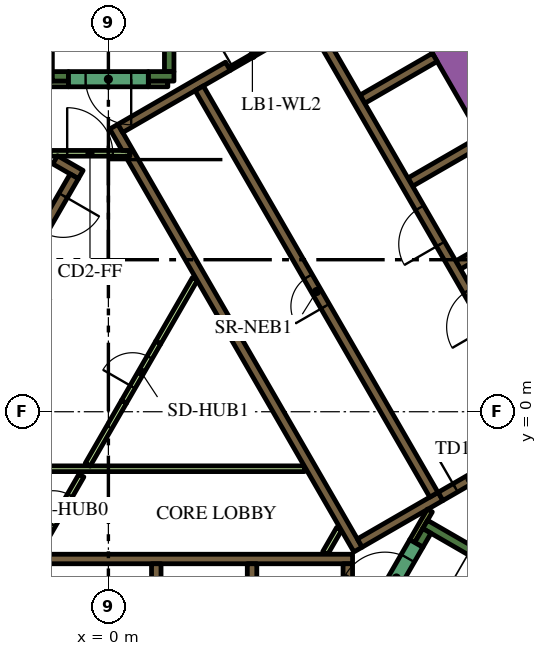
"""IFC4 building model, lengths in metres.
Left out: names, types, materials, properties, quantities, classifications, styles, units other than length and angle.
Written with IfcOpenShell. Run it as: python <this file> out.ifc"""

import sys

from ifc_helpers import new_model, si_unit, direction, frame, frame_2d, origin, place, context, subcontext, project, spatial, polyline, rectangle, outline, extrude, element, fill, save


model = new_model("IFC4")
c1 = context("Model", 3, precision=1e-05, world=origin(), true_north=direction((0.0, 1.0)))
c2 = subcontext(c1, "Body", "Model", "MODEL_VIEW")
j1 = project(units=[si_unit("LENGTHUNIT", "METRE"), si_unit("PLANEANGLEUNIT", "RADIAN")], contexts=[c1])
p1 = place(None, origin())
s1 = spatial("IfcSite", under=j1, at=p1, CompositionType="ELEMENT")
p2 = place(p1, origin())
s2 = spatial("IfcBuilding", under=s1, at=p2, CompositionType="ELEMENT")
p3 = place(p2, frame((0.0, 0.0, 95.4)))
s3 = spatial("IfcBuildingStorey", under=s2, at=p3, CompositionType="ELEMENT", Elevation=95.4)
p4 = place(p3, frame((6.776, 13.364, 0.0), z_axis=(0.0, 0.0, 1.0), x_axis=(0.500004177138, -0.8660229921, 0.0)))
e1 = element("IfcWall", 1, at=p4, inside=s3, PredefinedType="SOLIDWALL", context=c2, shape_type="SweptSolid", body=[
    extrude(rectangle(XDim=20.204, YDim=0.9, at=frame_2d((10.102, 0.0))), origin(), (0.0, 0.0, 1.0), 3.9),
])
p5 = place(p3, frame((8.334, -2.964, 0.0), z_axis=(0.0, 0.0, 1.0), x_axis=(0.866016039709, -0.500016218704, 0.0)))
e2 = element("IfcWall", 2, at=p5, inside=s3, PredefinedType="SOLIDWALL", context=c2, shape_type="SweptSolid", body=[
    extrude(rectangle(XDim=7.05, YDim=0.25, at=frame_2d((3.525, 0.0))), origin(), (0.0, 0.0, 1.0), 3.9),
])
p6 = place(p3, frame((8.168, -3.503, 0.0), z_axis=(0.0, 0.0, 1.0), x_axis=(0.49972245349, 0.866185586049, 0.0)))
e3 = element("IfcWall", 3, at=p6, inside=s3, PredefinedType="SOLIDWALL", context=c2, shape_type="SweptSolid", body=[
    extrude(rectangle(XDim=0.425, YDim=0.25, at=frame_2d((0.212, 0.0))), origin(), (0.0, 0.0, 1.0), 3.9),
])
p7 = place(p3, frame((1.6, 8.95, 0.0), z_axis=(0.0, 0.0, 1.0), x_axis=(0.0, 1.0, 0.0)))
e4 = element("IfcWall", 4, at=p7, inside=s3, PredefinedType="SOLIDWALL", context=c2, shape_type="SweptSolid", body=[
    extrude(rectangle(XDim=6.8, YDim=0.25, at=frame_2d((3.4, 0.0))), origin(), (0.0, 0.0, 1.0), 3.9),
])
p8 = place(p3, frame((1.05, 8.825, 0.0), z_axis=(0.0, 0.0, 1.0), x_axis=(1.0, 0.0, 0.0)))
e5 = element("IfcWall", 5, at=p8, inside=s3, PredefinedType="SOLIDWALL", context=c2, shape_type="SweptSolid", body=[
    extrude(rectangle(XDim=0.675, YDim=0.25, at=frame_2d((0.337, 0.0))), origin(), (0.0, 0.0, 1.0), 3.9),
])
p9 = place(p3, frame((-1.6, 8.7, 0.0), z_axis=(0.0, 0.0, 1.0), x_axis=(0.0, 1.0, 0.0)))
e6 = element("IfcWall", 6, at=p9, inside=s3, PredefinedType="SOLIDWALL", context=c2, shape_type="SweptSolid", body=[
    extrude(rectangle(XDim=7.05, YDim=0.25, at=frame_2d((3.525, 0.0))), origin(), (0.0, 0.0, 1.0), 3.9),
])
p10 = place(p3, frame((-1.475, 8.825, 0.0), z_axis=(0.0, 0.0, 1.0), x_axis=(1.0, 0.0, 0.0)))
e7 = element("IfcWall", 7, at=p10, inside=s3, PredefinedType="SOLIDWALL", context=c2, shape_type="SweptSolid", body=[
    extrude(rectangle(XDim=0.425, YDim=0.25, at=frame_2d((0.212, 0.0))), origin(), (0.0, 0.0, 1.0), 3.9),
])
p11 = place(p3, frame((-5.545, -3.875, 0.0), z_axis=(0.0, 0.0, 1.0), x_axis=(1.0, 0.0, 0.0)))
e8 = element("IfcWall", 8, at=p11, inside=s3, PredefinedType="SOLIDWALL", context=c2, shape_type="SweptSolid", body=[
    extrude(rectangle(XDim=11.97, YDim=0.25, at=frame_2d((5.985, 0.0))), origin(), (0.0, 0.0, 1.0), 3.9),
])
p12 = place(p3, frame((6.3, -7.268, 0.0), z_axis=(0.0, 0.0, 1.0), x_axis=(0.0, 1.0, 0.0)))
e9 = element("IfcWall", 9, at=p12, inside=s3, PredefinedType="SOLIDWALL", context=c2, shape_type="SweptSolid", body=[
    extrude(rectangle(XDim=3.268, YDim=0.25, at=frame_2d((1.634, 0.0))), origin(), (0.0, 0.0, 1.0), 3.9),
])
for number, where, z_axis, x_axis in (
    (10, (3.78, -4.0, 0.0), (0.0, 0.0, 1.0), (0.0, -1.0, 0.0)),
    (11, (1.26, -4.0, 0.0), (0.0, 0.0, 1.0), (0.0, -1.0, 0.0)),
):
    element("IfcWall", number, at=place(p3, frame(where, z_axis=z_axis, x_axis=x_axis)), inside=s3, PredefinedType="SOLIDWALL", context=c2, shape_type="SweptSolid", body=[
        extrude(rectangle(XDim=2.2, YDim=0.25, at=frame_2d((1.1, 0.0))), origin(), (0.0, 0.0, 1.0), 3.9),
    ])
p13 = place(p3, origin())
e12 = element("IfcWall", 12, at=p13, inside=s3, PredefinedType="SOLIDWALL", context=c2, shape_type="SweptSolid", body=[
    extrude(outline(polyline([(0.566, 6.725), (0.566, 6.875), (0.566, 6.875), (0.565, 6.875), (0.361, 6.875), (0.035, 7.439), (0.252, 7.564), (0.377, 7.348), (6.552, -3.348), (6.677, -3.564), (6.46, -3.689), (0.448, 6.725), (0.565, 6.725), (0.566, 6.725), (0.566, 6.725)])), origin(), (0.0, 0.0, 1.0), 3.9),
])
p14 = place(p3, frame((0.314, 7.456, 0.0), z_axis=(0.0, 0.0, 1.0), x_axis=(0.866013897511, 0.50001992892, 0.0)))
e13 = element("IfcWall", 13, at=p14, inside=s3, PredefinedType="SOLIDWALL", context=c2, shape_type="SweptSolid", body=[
    extrude(rectangle(XDim=3.268, YDim=0.25, at=frame_2d((1.634, 0.0))), origin(), (0.0, 0.0, 1.0), 3.9),
])
p15 = place(p3, frame((6.614, -3.456, 0.0), z_axis=(0.0, 0.0, 1.0), x_axis=(0.866031582473, 0.499989298045, 0.0)))
e14 = element("IfcWall", 14, at=p15, inside=s3, PredefinedType="SOLIDWALL", context=c2, shape_type="SweptSolid", body=[
    extrude(rectangle(XDim=2.455, YDim=0.25, at=frame_2d((1.228, 0.0))), origin(), (0.0, 0.0, 1.0), 3.9),
])
for number, where, z_axis, x_axis in (
    (15, (6.684, 8.224, 0.0), (0.0, 0.0, 1.0), (0.866, 0.5, 0.0)),
    (16, (7.944, 6.041, 0.0), (0.0, 0.0, 1.0), (0.866, 0.5, 0.0)),
    (17, (9.204, 3.859, 0.0), (0.0, 0.0, 1.0), (0.866, 0.5, 0.0)),
):
    element("IfcWall", number, at=place(p3, frame(where, z_axis=z_axis, x_axis=x_axis)), inside=s3, PredefinedType="SOLIDWALL", context=c2, shape_type="SweptSolid", body=[
        extrude(rectangle(XDim=2.2, YDim=0.25, at=frame_2d((1.1, 0.0))), origin(), (0.0, 0.0, 1.0), 3.9),
    ])
p16 = place(p3, frame((-0.728, 6.24, 0.0), z_axis=(0.0, 0.0, 1.0), x_axis=(-0.865955664968, 0.500120771724, 0.0)))
e18 = element("IfcWall", 18, at=p16, inside=s3, PredefinedType="SOLIDWALL", context=c2, shape_type="SweptSolid", body=[
    extrude(rectangle(XDim=0.778, YDim=0.25, at=frame_2d((0.389, 0.0))), origin(), (0.0, 0.0, 1.0), 3.9),
])
p17 = place(p3, frame((-2.196, 8.625, 0.0), z_axis=(0.0, 0.0, 1.0), x_axis=(1.0, 0.0, 0.0)))
e19 = element("IfcWall", 19, at=p17, inside=s3, PredefinedType="PARTITIONING", context=c2, shape_type="SweptSolid", body=[
    extrude(rectangle(XDim=1.146, YDim=0.15, at=frame_2d((0.573, 0.0))), origin(), (0.0, 0.0, 1.0), 2.75),
])
p18 = place(p3, frame((5.705, -3.718, 0.0), z_axis=(0.0, 0.0, 1.0), x_axis=(0.499962090823, 0.866047289552, 0.0)))
e20 = element("IfcWall", 20, at=p18, inside=s3, PredefinedType="PARTITIONING", context=c2, shape_type="SweptSolid", body=[
    extrude(rectangle(XDim=0.735, YDim=0.15, at=frame_2d((0.367, 0.0))), origin(), (0.0, 0.0, 1.0), 2.75),
])
p19 = place(p3, frame((8.459, -2.599, 0.0), z_axis=(0.0, 0.0, 1.0), x_axis=(-0.500041054325, -0.866001699761, 0.0)))
e21 = element("IfcWall", 21, at=p19, inside=s3, PredefinedType="PARTITIONING", context=c2, shape_type="SweptSolid", body=[
    extrude(rectangle(XDim=0.929, YDim=0.15, at=frame_2d((0.464, 0.0))), origin(), (0.0, 0.0, 1.0), 3.9),
])
p20 = place(p3, frame((-4.2, -1.5, 0.0), z_axis=(0.0, 0.0, 1.0), x_axis=(1.0, 0.0, 0.0)))
e22 = element("IfcWall", 22, at=p20, inside=s3, PredefinedType="PARTITIONING", context=c2, shape_type="SweptSolid", body=[
    extrude(rectangle(XDim=9.359, YDim=0.15, at=frame_2d((4.68, 0.0))), origin(), (0.0, 0.0, 1.0), 2.75),
])
p21 = place(p3, frame((-0.544, -1.393, 0.0), z_axis=(0.0, 0.0, 1.0), x_axis=(0.499928740635, 0.866066541489, 0.0)))
e23 = element("IfcWall", 23, at=p21, inside=s3, PredefinedType="PARTITIONING", context=c2, shape_type="SweptSolid", body=[
    extrude(rectangle(XDim=1.912, YDim=0.15, at=frame_2d((0.956, 0.0))), origin(), (0.0, 0.0, 1.0), 2.75),
])
p22 = place(p3, frame((1.312, 1.822, 0.0), z_axis=(0.0, 0.0, 1.0), x_axis=(0.500003549559, 0.866023354436, 0.0)))
e24 = element("IfcWall", 24, at=p22, inside=s3, PredefinedType="PARTITIONING", context=c2, shape_type="SweptSolid", body=[
    extrude(rectangle(XDim=1.93, YDim=0.15, at=frame_2d((0.965, 0.0))), origin(), (0.0, 0.0, 1.0), 2.75),
])
p23 = place(p3, frame((1.05, 8.625, 0.0), z_axis=(0.0, 0.0, 1.0), x_axis=(1.0, 0.0, 0.0)))
e25 = element("IfcWall", 25, at=p23, inside=s3, PredefinedType="PARTITIONING", context=c2, shape_type="SweptSolid", body=[
    extrude(rectangle(XDim=0.514, YDim=0.15, at=frame_2d((0.257, 0.0))), origin(), (0.0, 0.0, 1.0), 2.75),
])
p24 = place(p3, frame((11.553, -0.46, 0.0), z_axis=(0.0, 0.0, 1.0), x_axis=(-0.500006514828, 0.866021642414, 0.0)))
e26 = element("IfcWall", 26, at=p24, inside=s3, PredefinedType="SOLIDWALL", context=c2, shape_type="SweptSolid", body=[
    extrude(rectangle(XDim=12.35, YDim=0.25, at=frame_2d((6.175, 0.0))), origin(), (0.0, 0.0, 1.0), 3.9),
])
p25 = place(p24, frame((0.585, 0.0, 0.0)))
e27 = element("IfcOpeningElement", 27, at=p25, cuts=e26, PredefinedType="OPENING", context=c2, shape_type="SweptSolid", body=[
    extrude(rectangle(XDim=1.1, YDim=2.1, at=frame_2d((0.55, 1.05))), frame((0.0, 0.135, 0.0), z_axis=(0.0, -1.0, 0.0), x_axis=(1.0, 0.0, 0.0)), (0.0, 0.0, 1.0), 0.27),
])
p26 = place(p24, frame((3.105, 0.0, 0.0)))
e28 = element("IfcOpeningElement", 28, at=p26, cuts=e26, PredefinedType="OPENING", context=c2, shape_type="SweptSolid", body=[
    extrude(rectangle(XDim=1.1, YDim=2.1, at=frame_2d((0.55, 1.05))), frame((0.0, 0.135, 0.0), z_axis=(0.0, -1.0, 0.0), x_axis=(1.0, 0.0, 0.0)), (0.0, 0.0, 1.0), 0.27),
])
p27 = place(p24, frame((5.625, 0.0, 0.0)))
e29 = element("IfcOpeningElement", 29, at=p27, cuts=e26, PredefinedType="OPENING", context=c2, shape_type="SweptSolid", body=[
    extrude(rectangle(XDim=1.1, YDim=2.1, at=frame_2d((0.55, 1.05))), frame((0.0, 0.135, 0.0), z_axis=(0.0, -1.0, 0.0), x_axis=(1.0, 0.0, 0.0)), (0.0, 0.0, 1.0), 0.27),
])
p28 = place(p3, frame((8.565, -2.185, 0.0), z_axis=(0.0, 0.0, 1.0), x_axis=(-0.499997954832, 0.866026584559, 0.0)))
e30 = element("IfcWall", 30, at=p28, inside=s3, PredefinedType="SOLIDWALL", context=c2, shape_type="SweptSolid", body=[
    extrude(rectangle(XDim=12.35, YDim=0.25, at=frame_2d((6.175, 0.0))), origin(), (0.0, 0.0, 1.0), 3.9),
])
p29 = place(p28, frame((5.725, 0.0, 0.0)))
e31 = element("IfcOpeningElement", 31, at=p29, cuts=e30, PredefinedType="OPENING", context=c2, shape_type="SweptSolid", body=[
    extrude(rectangle(XDim=0.9, YDim=2.1, at=frame_2d((0.45, 1.05))), frame((0.0, 0.135, 0.0), z_axis=(0.0, -1.0, 0.0), x_axis=(1.0, 0.0, 0.0)), (0.0, 0.0, 1.0), 0.27),
])
p30 = place(p3, frame((-0.898, 6.194, 0.0), z_axis=(0.0, 0.0, 1.0), x_axis=(-0.499996202215, -0.866027596426, 0.0)))
e32 = element("IfcWall", 32, at=p30, inside=s3, PredefinedType="SOLIDWALL", context=c2, shape_type="SweptSolid", body=[
    extrude(rectangle(XDim=9.83, YDim=0.25, at=frame_2d((4.915, 0.0))), origin(), (0.0, 0.0, 1.0), 3.9),
])
p31 = place(p30, frame((0.585, 0.0, 0.0)))
e33 = element("IfcOpeningElement", 33, at=p31, cuts=e32, PredefinedType="OPENING", context=c2, shape_type="SweptSolid", body=[
    extrude(rectangle(XDim=1.1, YDim=2.1, at=frame_2d((0.55, 1.05))), frame((0.0, 0.135, 0.0), z_axis=(0.0, -1.0, 0.0), x_axis=(1.0, 0.0, 0.0)), (0.0, 0.0, 1.0), 0.27),
])
p32 = place(p30, frame((3.105, 0.0, 0.0)))
e34 = element("IfcOpeningElement", 34, at=p32, cuts=e32, PredefinedType="OPENING", context=c2, shape_type="SweptSolid", body=[
    extrude(rectangle(XDim=1.1, YDim=2.1, at=frame_2d((0.55, 1.05))), frame((0.0, 0.135, 0.0), z_axis=(0.0, -1.0, 0.0), x_axis=(1.0, 0.0, 0.0)), (0.0, 0.0, 1.0), 0.27),
])
p33 = place(p30, frame((5.625, 0.0, 0.0)))
e35 = element("IfcOpeningElement", 35, at=p33, cuts=e32, PredefinedType="OPENING", context=c2, shape_type="SweptSolid", body=[
    extrude(rectangle(XDim=1.1, YDim=2.1, at=frame_2d((0.55, 1.05))), frame((0.0, 0.135, 0.0), z_axis=(0.0, -1.0, 0.0), x_axis=(1.0, 0.0, 0.0)), (0.0, 0.0, 1.0), 0.27),
])
p34 = place(p30, frame((8.145, 0.0, 0.0)))
e36 = element("IfcOpeningElement", 36, at=p34, cuts=e32, PredefinedType="OPENING", context=c2, shape_type="SweptSolid", body=[
    extrude(rectangle(XDim=1.1, YDim=2.1, at=frame_2d((0.55, 1.05))), frame((0.0, 0.135, 0.0), z_axis=(0.0, -1.0, 0.0), x_axis=(1.0, 0.0, 0.0)), (0.0, 0.0, 1.0), 0.27),
])
p35 = place(p3, frame((7.053, -5.284, 0.0), z_axis=(0.0, 0.0, 1.0), x_axis=(0.500078061341, 0.865980330357, 0.0)))
e37 = element("IfcWall", 37, at=p35, inside=s3, PredefinedType="SOLIDWALL", context=c2, shape_type="SweptSolid", body=[
    extrude(rectangle(XDim=2.1, YDim=0.4, at=frame_2d((1.05, 0.0))), origin(), (0.0, 0.0, 1.0), 3.9),
])
p36 = place(p35, frame((0.45, 0.0, 0.0)))
e38 = element("IfcOpeningElement", 38, at=p36, cuts=e37, PredefinedType="OPENING", context=c2, shape_type="SweptSolid", body=[
    extrude(rectangle(XDim=1.2, YDim=2.1, at=frame_2d((0.6, 1.05))), frame((0.0, 0.21, 0.0), z_axis=(0.0, -1.0, 0.0), x_axis=(1.0, 0.0, 0.0)), (0.0, 0.0, 1.0), 0.42),
])
p37 = place(p3, frame((8.74, -2.229, 0.0), z_axis=(0.0, 0.0, 1.0), x_axis=(0.865989075817, 0.500062916607, 0.0)))
e39 = element("IfcWall", 39, at=p37, inside=s3, PredefinedType="SOLIDWALL", context=c2, shape_type="SweptSolid", body=[
    extrude(rectangle(XDim=1.8, YDim=0.25, at=frame_2d((0.9, 0.0))), origin(), (0.0, 0.0, 1.0), 3.9),
])
p38 = place(p37, frame((0.45, 0.0, 0.0)))
e40 = element("IfcOpeningElement", 40, at=p38, cuts=e39, PredefinedType="OPENING", context=c2, shape_type="SweptSolid", body=[
    extrude(rectangle(XDim=0.9, YDim=2.1, at=frame_2d((0.45, 1.05))), frame((0.0, 0.135, 0.0), z_axis=(0.0, -1.0, 0.0), x_axis=(1.0, 0.0, 0.0)), (0.0, 0.0, 1.0), 0.27),
])
p39 = place(p3, frame((1.05, 8.75, 0.0), z_axis=(0.0, 0.0, 1.0), x_axis=(-1.0, 0.0, 0.0)))
e41 = element("IfcWall", 41, at=p39, inside=s3, PredefinedType="SOLIDWALL", context=c2, shape_type="SweptSolid", body=[
    extrude(rectangle(XDim=2.1, YDim=0.4, at=frame_2d((1.05, 0.0))), origin(), (0.0, 0.0, 1.0), 3.9),
])
p40 = place(p39, frame((0.45, 0.0, 0.0)))
e42 = element("IfcOpeningElement", 42, at=p40, cuts=e41, PredefinedType="OPENING", context=c2, shape_type="SweptSolid", body=[
    extrude(rectangle(XDim=1.2, YDim=2.1, at=frame_2d((0.6, 1.05))), frame((0.0, 0.21, 0.0), z_axis=(0.0, -1.0, 0.0), x_axis=(1.0, 0.0, 0.0)), (0.0, 0.0, 1.0), 0.42),
])
p41 = place(p3, frame((-1.76, -3.498, 0.0), z_axis=(0.0, 0.0, 1.0), x_axis=(0.499977374825, 0.866038466041, 0.0)))
e43 = element("IfcWall", 43, at=p41, inside=s3, PredefinedType="PARTITIONING", context=c2, shape_type="SweptSolid", body=[
    extrude(rectangle(XDim=2.1, YDim=0.15, at=frame_2d((1.05, 0.0))), origin(), (0.0, 0.0, 1.0), 2.75),
])
p42 = place(p41, frame((0.6, 0.0, 0.0)))
e44 = element("IfcOpeningElement", 44, at=p42, cuts=e43, PredefinedType="OPENING", context=c2, shape_type="SweptSolid", body=[
    extrude(rectangle(XDim=0.9, YDim=2.1, at=frame_2d((0.45, 1.05))), frame((0.0, 0.085, 0.0), z_axis=(0.0, -1.0, 0.0), x_axis=(1.0, 0.0, 0.0)), (0.0, 0.0, 1.0), 0.17),
])
p43 = place(p3, frame((-1.534, 6.8, 0.0), z_axis=(0.0, 0.0, 1.0), x_axis=(1.0, 0.0, 0.0)))
e45 = element("IfcWall", 45, at=p43, inside=s3, PredefinedType="PARTITIONING", context=c2, shape_type="SweptSolid", body=[
    extrude(rectangle(XDim=2.1, YDim=0.15, at=frame_2d((1.05, 0.0))), origin(), (0.0, 0.0, 1.0), 2.75),
])
p44 = place(p43, frame((0.45, 0.0, 0.0)))
e46 = element("IfcOpeningElement", 46, at=p44, cuts=e45, PredefinedType="OPENING", context=c2, shape_type="SweptSolid", body=[
    extrude(rectangle(XDim=1.2, YDim=2.1, at=frame_2d((0.6, 1.05))), frame((0.0, 0.085, 0.0), z_axis=(0.0, -1.0, 0.0), x_axis=(1.0, 0.0, 0.0)), (0.0, 0.0, 1.0), 0.17),
])
p45 = place(p3, frame((3.183, 9.02, 0.0), z_axis=(0.0, 0.0, 1.0), x_axis=(0.866034573852, 0.49998411664, 0.0)))
e47 = element("IfcWall", 47, at=p45, inside=s3, PredefinedType="PARTITIONING", context=c2, shape_type="SweptSolid", body=[
    extrude(rectangle(XDim=1.4, YDim=0.09, at=frame_2d((0.7, 0.0))), origin(), (0.0, 0.0, 1.0), 2.75),
])
p46 = place(p45, frame((0.1, 0.0, 0.0)))
e48 = element("IfcOpeningElement", 48, at=p46, cuts=e47, PredefinedType="OPENING", context=c2, shape_type="SweptSolid", body=[
    extrude(rectangle(XDim=1.2, YDim=2.1, at=frame_2d((0.6, 1.05))), frame((0.0, 0.055, 0.0), z_axis=(0.0, -1.0, 0.0), x_axis=(1.0, 0.0, 0.0)), (0.0, 0.0, 1.0), 0.11),
])
p47 = place(p3, frame((0.412, 0.263, 0.0), z_axis=(0.0, 0.0, 1.0), x_axis=(0.500062916607, 0.865989075817, 0.0)))
e49 = element("IfcWall", 49, at=p47, inside=s3, PredefinedType="PARTITIONING", context=c2, shape_type="SweptSolid", body=[
    extrude(rectangle(XDim=1.8, YDim=0.15, at=frame_2d((0.9, 0.0))), origin(), (0.0, 0.0, 1.0), 2.75),
])
p48 = place(p47, frame((0.45, 0.0, 0.0)))
e50 = element("IfcOpeningElement", 50, at=p48, cuts=e49, PredefinedType="OPENING", context=c2, shape_type="SweptSolid", body=[
    extrude(rectangle(XDim=0.9, YDim=2.1, at=frame_2d((0.45, 1.05))), frame((0.0, 0.085, 0.0), z_axis=(0.0, -1.0, 0.0), x_axis=(1.0, 0.0, 0.0)), (0.0, 0.0, 1.0), 0.17),
])
p49 = place(p3, frame((6.163, 18.475, 0.0), z_axis=(0.0, 0.0, 1.0), x_axis=(0.500001317485, -0.866024643133, 0.0)))
e51 = element("IfcWall", 51, at=p49, inside=s3, PredefinedType="PARTITIONING", context=c2, shape_type="SweptSolid", body=[
    extrude(rectangle(XDim=25.767, YDim=0.15, at=frame_2d((12.883, 0.0))), origin(), (0.0, 0.0, 1.0), 2.75),
])
p50 = place(p49, frame((24.241, 0.0, 0.0)))
e52 = element("IfcOpeningElement", 52, at=p50, cuts=e51, PredefinedType="OPENING", context=c2, shape_type="SweptSolid", body=[
    extrude(rectangle(XDim=1.0, YDim=2.1, at=frame_2d((0.5, 1.05))), frame((0.0, 0.085, 0.0), z_axis=(0.0, -1.0, 0.0), x_axis=(1.0, 0.0, 0.0)), (0.0, 0.0, 1.0), 0.17),
])
p51 = place(p49, frame((13.144, 0.0, 0.0)))
e53 = element("IfcOpeningElement", 53, at=p51, cuts=e51, PredefinedType="OPENING", context=c2, shape_type="SweptSolid", body=[
    extrude(rectangle(XDim=1.0, YDim=2.1, at=frame_2d((0.5, 1.05))), frame((0.0, 0.085, 0.0), z_axis=(0.0, -1.0, 0.0), x_axis=(1.0, 0.0, 0.0)), (0.0, 0.0, 1.0), 0.17),
])
p52 = place(p49, frame((11.592, 0.0, 0.0)))
e54 = element("IfcOpeningElement", 54, at=p52, cuts=e51, PredefinedType="OPENING", context=c2, shape_type="SweptSolid", body=[
    extrude(rectangle(XDim=1.1, YDim=2.1, at=frame_2d((0.55, 1.05))), frame((0.0, 0.085, 0.0), z_axis=(0.0, -1.0, 0.0), x_axis=(1.0, 0.0, 0.0)), (0.0, 0.0, 1.0), 0.17),
])
p53 = place(p49, frame((4.674, 0.0, 0.0)))
e55 = element("IfcOpeningElement", 55, at=p53, cuts=e51, PredefinedType="OPENING", context=c2, shape_type="SweptSolid", body=[
    extrude(rectangle(XDim=0.9, YDim=2.1, at=frame_2d((0.45, 1.05))), frame((0.0, 0.085, 0.0), z_axis=(0.0, -1.0, 0.0), x_axis=(1.0, 0.0, 0.0)), (0.0, 0.0, 1.0), 0.17),
])
p54 = place(p49, frame((2.411, 0.0, 0.0)))
e56 = element("IfcOpeningElement", 56, at=p54, cuts=e51, PredefinedType="OPENING", context=c2, shape_type="SweptSolid", body=[
    extrude(rectangle(XDim=1.0, YDim=2.1, at=frame_2d((0.5, 1.05))), frame((0.0, 0.085, 0.0), z_axis=(0.0, -1.0, 0.0), x_axis=(1.0, 0.0, 0.0)), (0.0, 0.0, 1.0), 0.17),
])
p55 = place(p26, origin())
e57 = element("IfcDoor", 57, at=p55, inside=s3, OperationType="DOUBLE_DOOR_SLIDING", PredefinedType="DOOR", context=c2, shape_type="SweptSolid", body=[
    extrude(rectangle(XDim=1.1, YDim=2.1, at=frame_2d((0.55, 1.05))), frame((0.0, 0.025, 0.0), z_axis=(0.0, -1.0, 0.0), x_axis=(1.0, 0.0, 0.0)), (0.0, 0.0, 1.0), 0.05),
])
fill(e28, e57)
p56 = place(p27, origin())
e58 = element("IfcDoor", 58, at=p56, inside=s3, OperationType="DOUBLE_DOOR_SLIDING", PredefinedType="DOOR", context=c2, shape_type="SweptSolid", body=[
    extrude(rectangle(XDim=1.1, YDim=2.1, at=frame_2d((0.55, 1.05))), frame((0.0, 0.025, 0.0), z_axis=(0.0, -1.0, 0.0), x_axis=(1.0, 0.0, 0.0)), (0.0, 0.0, 1.0), 0.05),
])
fill(e29, e58)
p57 = place(p29, origin())
e59 = element("IfcDoor", 59, at=p57, inside=s3, OperationType="SINGLE_SWING_LEFT", PredefinedType="DOOR", context=c2, shape_type="SweptSolid", body=[
    extrude(rectangle(XDim=0.9, YDim=2.1, at=frame_2d((0.45, 1.05))), frame((0.0, 0.025, 0.0), z_axis=(0.0, -1.0, 0.0), x_axis=(1.0, 0.0, 0.0)), (0.0, 0.0, 1.0), 0.05),
])
fill(e31, e59)
p58 = place(p31, origin())
e60 = element("IfcDoor", 60, at=p58, inside=s3, OperationType="DOUBLE_DOOR_SLIDING", PredefinedType="DOOR", context=c2, shape_type="SweptSolid", body=[
    extrude(rectangle(XDim=1.1, YDim=2.1, at=frame_2d((0.55, 1.05))), frame((0.0, 0.025, 0.0), z_axis=(0.0, -1.0, 0.0), x_axis=(1.0, 0.0, 0.0)), (0.0, 0.0, 1.0), 0.05),
])
fill(e33, e60)
p59 = place(p36, origin())
e61 = element("IfcDoor", 61, at=p59, inside=s3, OperationType="SINGLE_SWING_LEFT", PredefinedType="DOOR", context=c2, shape_type="SweptSolid", body=[
    extrude(rectangle(XDim=1.2, YDim=2.1, at=frame_2d((0.6, 1.05))), frame((0.0, 0.025, 0.0), z_axis=(0.0, -1.0, 0.0), x_axis=(1.0, 0.0, 0.0)), (0.0, 0.0, 1.0), 0.05),
])
fill(e38, e61)
p60 = place(p38, origin())
e62 = element("IfcDoor", 62, at=p60, inside=s3, OperationType="SINGLE_SWING_LEFT", PredefinedType="DOOR", context=c2, shape_type="SweptSolid", body=[
    extrude(rectangle(XDim=0.9, YDim=2.1, at=frame_2d((0.45, 1.05))), frame((0.0, 0.025, 0.0), z_axis=(0.0, -1.0, 0.0), x_axis=(1.0, 0.0, 0.0)), (0.0, 0.0, 1.0), 0.05),
])
fill(e40, e62)
p61 = place(p40, origin())
e63 = element("IfcDoor", 63, at=p61, inside=s3, OperationType="SINGLE_SWING_LEFT", PredefinedType="DOOR", context=c2, shape_type="SweptSolid", body=[
    extrude(rectangle(XDim=1.2, YDim=2.1, at=frame_2d((0.6, 1.05))), frame((0.0, 0.025, 0.0), z_axis=(0.0, -1.0, 0.0), x_axis=(1.0, 0.0, 0.0)), (0.0, 0.0, 1.0), 0.05),
])
fill(e42, e63)
p62 = place(p42, origin())
e64 = element("IfcDoor", 64, at=p62, inside=s3, OperationType="SINGLE_SWING_LEFT", PredefinedType="DOOR", context=c2, shape_type="SweptSolid", body=[
    extrude(rectangle(XDim=0.9, YDim=2.1, at=frame_2d((0.45, 1.05))), frame((0.0, 0.025, 0.0), z_axis=(0.0, -1.0, 0.0), x_axis=(1.0, 0.0, 0.0)), (0.0, 0.0, 1.0), 0.05),
])
fill(e44, e64)
p63 = place(p44, origin())
e65 = element("IfcDoor", 65, at=p63, inside=s3, OperationType="SINGLE_SWING_LEFT", PredefinedType="DOOR", context=c2, shape_type="SweptSolid", body=[
    extrude(rectangle(XDim=1.2, YDim=2.1, at=frame_2d((0.6, 1.05))), frame((0.0, 0.025, 0.0), z_axis=(0.0, -1.0, 0.0), x_axis=(1.0, 0.0, 0.0)), (0.0, 0.0, 1.0), 0.05),
])
fill(e46, e65)
p64 = place(p46, origin())
e66 = element("IfcDoor", 66, at=p64, inside=s3, OperationType="SINGLE_SWING_LEFT", PredefinedType="DOOR", context=c2, shape_type="SweptSolid", body=[
    extrude(rectangle(XDim=1.2, YDim=2.1, at=frame_2d((0.6, 1.05))), frame((0.0, 0.025, 0.0), z_axis=(0.0, -1.0, 0.0), x_axis=(1.0, 0.0, 0.0)), (0.0, 0.0, 1.0), 0.05),
])
fill(e48, e66)
p65 = place(p48, origin())
e67 = element("IfcDoor", 67, at=p65, inside=s3, OperationType="SINGLE_SWING_LEFT", PredefinedType="DOOR", context=c2, shape_type="SweptSolid", body=[
    extrude(rectangle(XDim=0.9, YDim=2.1, at=frame_2d((0.45, 1.05))), frame((0.0, 0.025, 0.0), z_axis=(0.0, -1.0, 0.0), x_axis=(1.0, 0.0, 0.0)), (0.0, 0.0, 1.0), 0.05),
])
fill(e50, e67)
save(model, sys.argv[1])
